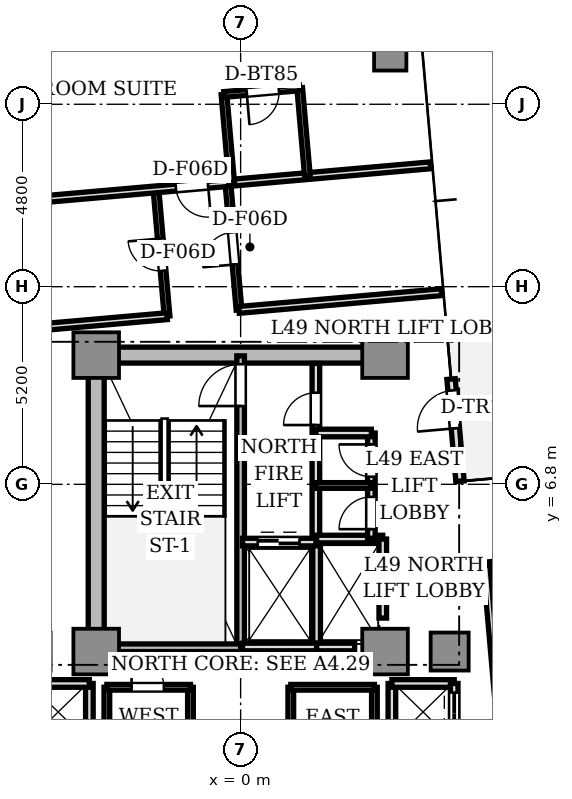
"""IFC4 building model, lengths in metres.
Left out: names, types, materials, properties, quantities, classifications, styles, units other than length and angle.
Written with IfcOpenShell. Run it as: python <this file> out.ifc"""

import sys

from ifc_helpers import new_model, si_unit, direction, frame, frame_2d, origin, origin_2d, place, context, subcontext, project, spatial, rectangle, extrude, source, transform, mapped, element, fill, save


model = new_model("IFC4")
c1 = context("Model", 3, precision=1e-05, world=origin(), true_north=direction((0.0, 1.0)))
c2 = subcontext(c1, "Body", "Model", "MODEL_VIEW")
j1 = project(units=[si_unit("LENGTHUNIT", "METRE"), si_unit("PLANEANGLEUNIT", "RADIAN")], contexts=[c1])
p1 = place(None, origin())
s1 = spatial("IfcSite", under=j1, at=p1, CompositionType="ELEMENT")
p2 = place(p1, origin())
s2 = spatial("IfcBuilding", under=s1, at=p2, CompositionType="ELEMENT")
p3 = place(p2, frame((0.0, 0.0, 178.55)))
s3 = spatial("IfcBuildingStorey", under=s2, at=p3, CompositionType="ELEMENT", Elevation=178.55)
p4 = place(p3, frame((-3.55, 10.2, 0.0), z_axis=(0.0, 0.0, 1.0), x_axis=(1.0, 0.0, 0.0)))
e1 = element("IfcWall", 1, at=p4, inside=s3, PredefinedType="SHEAR", context=c2, shape_type="SweptSolid", body=[
    extrude(rectangle(XDim=7.1, YDim=0.42, at=frame_2d((3.55, 0.0))), origin(), (0.0, 0.0, 1.0), 3.11),
])
p5 = place(p3, frame((-3.8, 2.85, 0.0), z_axis=(0.0, 0.0, 1.0), x_axis=(0.0, 1.0, 0.0)))
e2 = element("IfcWall", 2, at=p5, inside=s3, PredefinedType="SHEAR", context=c2, shape_type="SweptSolid", body=[
    extrude(rectangle(XDim=6.9, YDim=0.42, at=frame_2d((3.45, 0.0))), origin(), (0.0, 0.0, 1.0), 3.11),
])
m1 = source(origin(), c2, "Body", "SweptSolid", [
    extrude(rectangle(XDim=1.2, YDim=1.2, at=origin_2d()), origin(), (0.0, 0.0, 1.0), 3.11),
])
for number, where, z_axis, x_axis in (
    (3, (-3.8, 2.4, 0.0), (0.0, 0.0, 1.0), (1.0, 0.0, 0.0)),
    (4, (3.8, 2.4, 0.0), (0.0, 0.0, 1.0), (1.0, 0.0, 0.0)),
    (5, (-3.8, 10.2, 0.0), (0.0, 0.0, 1.0), (1.0, 0.0, 0.0)),
    (6, (3.8, 10.2, 0.0), (0.0, 0.0, 1.0), (1.0, 0.0, 0.0)),
):
    element("IfcColumn", number, at=place(p3, frame(where, z_axis=z_axis, x_axis=x_axis)), inside=s3, PredefinedType="COLUMN", context=c2, shape_type="MappedRepresentation", body=[
        mapped(m1, transform((0.0, 0.0, 0.0), scale=1.0)),
    ])
m2 = source(origin(), c2, "Body", "SweptSolid", [
    extrude(rectangle(XDim=1.0, YDim=1.0, at=origin_2d()), origin(), (0.0, 0.0, 1.0), 3.11),
])
p6 = place(p3, frame((5.5, 2.4, 0.0), z_axis=(0.0, 0.0, 1.0), x_axis=(1.0, 0.0, 0.0)))
e7 = element("IfcColumn", 7, at=p6, inside=s3, PredefinedType="COLUMN", context=c2, shape_type="MappedRepresentation", body=[
    mapped(m2, transform((0.0, 0.0, 0.0), scale=1.0)),
])
m3 = source(origin(), c2, "Body", "SweptSolid", [
    extrude(rectangle(XDim=0.85, YDim=0.85, at=origin_2d()), origin(), (0.0, 0.0, 1.0), 3.11),
])
p7 = place(p3, frame((3.936, 18.112, 0.0), z_axis=(0.0, 0.0, 1.0), x_axis=(1.0, 0.0, 0.0)))
e8 = element("IfcColumn", 8, at=p7, inside=s3, PredefinedType="COLUMN", context=c2, shape_type="MappedRepresentation", body=[
    mapped(m3, transform((0.0, 0.0, 0.0), scale=1.0)),
])
p8 = place(p3, frame((5.772, 6.879, 0.0), z_axis=(0.0, 0.0, 1.0), x_axis=(-0.087168071984, 0.996193619346, 0.0)))
e9 = element("IfcWall", 9, at=p8, inside=s3, PredefinedType="STANDARD", context=c2, shape_type="SweptSolid", body=[
    extrude(rectangle(XDim=2.7, YDim=0.22, at=frame_2d((1.35, 0.0))), origin(), (0.0, 0.0, 1.0), 3.11),
])
p9 = place(p8, frame((1.4, 0.0, 0.0)))
e10 = element("IfcOpeningElement", 10, at=p9, cuts=e9, PredefinedType="OPENING", context=c2, shape_type="SweptSolid", body=[
    extrude(rectangle(XDim=1.0, YDim=2.2, at=frame_2d((0.5, 1.1))), frame((0.0, 0.12, 0.0), z_axis=(0.0, -1.0, 0.0), x_axis=(1.0, 0.0, 0.0)), (0.0, 0.0, 1.0), 0.24),
])
p10 = place(p3, frame((0.0, 2.5, 0.0), z_axis=(0.0, 0.0, 1.0), x_axis=(0.0, 1.0, 0.0)))
e11 = element("IfcWall", 11, at=p10, inside=s3, PredefinedType="SOLIDWALL", context=c2, shape_type="SweptSolid", body=[
    extrude(rectangle(XDim=7.68, YDim=0.2, at=frame_2d((3.84, 0.0))), origin(), (0.0, 0.0, 1.0), 3.11),
])
p11 = place(p10, frame((6.36, 0.0, 0.0)))
e12 = element("IfcOpeningElement", 12, at=p11, cuts=e11, PredefinedType="OPENING", context=c2, shape_type="SweptSolid", body=[
    extrude(rectangle(XDim=1.1, YDim=2.15, at=frame_2d((0.55, 1.075))), frame((0.0, 0.11, 0.0), z_axis=(0.0, -1.0, 0.0), x_axis=(1.0, 0.0, 0.0)), (0.0, 0.0, 1.0), 0.22),
])
p12 = place(p3, frame((-3.72, 2.5, 0.0), z_axis=(0.0, 0.0, 1.0), x_axis=(1.0, 0.0, 0.0)))
e13 = element("IfcWall", 13, at=p12, inside=s3, PredefinedType="SOLIDWALL", context=c2, shape_type="SweptSolid", body=[
    extrude(rectangle(XDim=3.72, YDim=0.2, at=frame_2d((1.86, 0.0))), origin(), (0.0, 0.0, 1.0), 3.11),
])
p13 = place(p3, frame((1.98, 5.32, 0.0), z_axis=(0.0, 0.0, 1.0), x_axis=(0.0, 1.0, 0.0)))
e14 = element("IfcWall", 14, at=p13, inside=s3, PredefinedType="SOLIDWALL", context=c2, shape_type="SweptSolid", body=[
    extrude(rectangle(XDim=4.66, YDim=0.2, at=frame_2d((2.33, 0.0))), origin(), (0.0, 0.0, 1.0), 2.66),
])
p14 = place(p13, frame((3.04, 0.0, 0.0)))
e15 = element("IfcOpeningElement", 15, at=p14, cuts=e14, PredefinedType="OPENING", context=c2, shape_type="SweptSolid", body=[
    extrude(rectangle(XDim=0.85, YDim=2.1, at=frame_2d((0.425, 1.05))), frame((0.0, 0.11, 0.0), z_axis=(0.0, -1.0, 0.0), x_axis=(1.0, 0.0, 0.0)), (0.0, 0.0, 1.0), 0.22),
])
p15 = place(p3, frame((2.0, 2.5, 0.0), z_axis=(0.0, 0.0, 1.0), x_axis=(0.0, 1.0, 0.0)))
e16 = element("IfcWall", 16, at=p15, inside=s3, PredefinedType="SOLIDWALL", context=c2, shape_type="SweptSolid", body=[
    extrude(rectangle(XDim=2.78, YDim=0.2, at=frame_2d((1.39, 0.0))), origin(), (0.0, 0.0, 1.0), 2.66),
])
p16 = place(p3, frame((0.05, 2.52, 0.0), z_axis=(0.0, 0.0, 1.0), x_axis=(1.0, 0.0, 0.0)))
e17 = element("IfcWall", 17, at=p16, inside=s3, PredefinedType="SOLIDWALL", context=c2, shape_type="SweptSolid", body=[
    extrude(rectangle(XDim=1.95, YDim=0.2, at=frame_2d((0.975, 0.0))), origin(), (0.0, 0.0, 1.0), 2.66),
])
p17 = place(p3, frame((0.05, 5.28, 0.0), z_axis=(0.0, 0.0, 1.0), x_axis=(1.0, 0.0, 0.0)))
e18 = element("IfcWall", 18, at=p17, inside=s3, PredefinedType="SOLIDWALL", context=c2, shape_type="SweptSolid", body=[
    extrude(rectangle(XDim=1.93, YDim=0.2, at=frame_2d((0.965, 0.0))), origin(), (0.0, 0.0, 1.0), 2.66),
])
p18 = place(p17, frame((0.4, 0.0, 0.0)))
e19 = element("IfcOpeningElement", 19, at=p18, cuts=e18, PredefinedType="OPENING", context=c2, shape_type="SweptSolid", body=[
    extrude(rectangle(XDim=1.1, YDim=2.2, at=frame_2d((0.55, 1.1))), frame((0.0, 0.11, 0.0), z_axis=(0.0, -1.0, 0.0), x_axis=(1.0, 0.0, 0.0)), (0.0, 0.0, 1.0), 0.22),
])
p19 = place(p3, frame((2.0, 2.52, 0.0), z_axis=(0.0, 0.0, 1.0), x_axis=(1.0, 0.0, 0.0)))
e20 = element("IfcWall", 20, at=p19, inside=s3, PredefinedType="SOLIDWALL", context=c2, shape_type="SweptSolid", body=[
    extrude(rectangle(XDim=1.0, YDim=0.2, at=frame_2d((0.5, 0.0))), origin(), (0.0, 0.0, 1.0), 2.66),
])
p20 = place(p3, frame((2.0, 5.36, 0.0), z_axis=(0.0, 0.0, 1.0), x_axis=(1.0, 0.0, 0.0)))
e21 = element("IfcWall", 21, at=p20, inside=s3, PredefinedType="SOLIDWALL", context=c2, shape_type="SweptSolid", body=[
    extrude(rectangle(XDim=1.74, YDim=0.2, at=frame_2d((0.87, 0.0))), origin(), (0.0, 0.0, 1.0), 2.66),
])
p21 = place(p3, frame((3.74, 3.28, 0.0), z_axis=(0.0, 0.0, 1.0), x_axis=(0.0, 1.0, 0.0)))
e22 = element("IfcWall", 22, at=p21, inside=s3, PredefinedType="SOLIDWALL", context=c2, shape_type="SweptSolid", body=[
    extrude(rectangle(XDim=2.08, YDim=0.2, at=frame_2d((1.04, 0.0))), origin(), (0.0, 0.0, 1.0), 2.66),
])
p22 = place(p21, frame((0.44, 0.0, 0.0)))
e23 = element("IfcOpeningElement", 23, at=p22, cuts=e22, PredefinedType="OPENING", context=c2, shape_type="SweptSolid", body=[
    extrude(rectangle(XDim=1.2, YDim=2.2, at=frame_2d((0.6, 1.1))), frame((0.0, 0.11, 0.0), z_axis=(0.0, -1.0, 0.0), x_axis=(1.0, 0.0, 0.0)), (0.0, 0.0, 1.0), 0.22),
])
p23 = place(p3, frame((3.98, -1.56, 0.0), z_axis=(0.0, 0.0, 1.0), x_axis=(0.0, 1.0, 0.0)))
e24 = element("IfcWall", 24, at=p23, inside=s3, PredefinedType="SOLIDWALL", context=c2, shape_type="SweptSolid", body=[
    extrude(rectangle(XDim=3.12, YDim=0.2, at=frame_2d((1.56, 0.0))), origin(), (0.0, 0.0, 1.0), 2.28),
])
p24 = place(p3, frame((3.98, 1.56, 0.0), z_axis=(0.0, 0.0, 1.0), x_axis=(1.0, 0.0, 0.0)))
e25 = element("IfcWall", 25, at=p24, inside=s3, PredefinedType="SOLIDWALL", context=c2, shape_type="SweptSolid", body=[
    extrude(rectangle(XDim=1.64, YDim=0.2, at=frame_2d((0.82, 0.0))), origin(), (0.0, 0.0, 1.0), 2.66),
])
p25 = place(p3, frame((5.62, 0.0, 0.0), z_axis=(0.0, 0.0, 1.0), x_axis=(0.0, 1.0, 0.0)))
e26 = element("IfcWall", 26, at=p25, inside=s3, PredefinedType="SOLIDWALL", context=c2, shape_type="SweptSolid", body=[
    extrude(rectangle(XDim=1.56, YDim=0.2, at=frame_2d((0.78, 0.0))), origin(), (0.0, 0.0, 1.0), 2.66),
])
p26 = place(p25, frame((0.22, 0.0, 0.0)))
e27 = element("IfcOpeningElement", 27, at=p26, cuts=e26, PredefinedType="OPENING", context=c2, shape_type="SweptSolid", body=[
    extrude(rectangle(XDim=1.1, YDim=2.2, at=frame_2d((0.55, 1.1))), frame((0.0, 0.11, 0.0), z_axis=(0.0, -1.0, 0.0), x_axis=(1.0, 0.0, 0.0)), (0.0, 0.0, 1.0), 0.22),
])
p27 = place(p3, frame((-3.98, -1.56, 0.0), z_axis=(0.0, 0.0, 1.0), x_axis=(0.0, 1.0, 0.0)))
e28 = element("IfcWall", 28, at=p27, inside=s3, PredefinedType="SOLIDWALL", context=c2, shape_type="SweptSolid", body=[
    extrude(rectangle(XDim=3.12, YDim=0.2, at=frame_2d((1.56, 0.0))), origin(), (0.0, 0.0, 1.0), 2.28),
])
p28 = place(p3, frame((-5.62, 1.56, 0.0), z_axis=(0.0, 0.0, 1.0), x_axis=(1.0, 0.0, 0.0)))
e29 = element("IfcWall", 29, at=p28, inside=s3, PredefinedType="SOLIDWALL", context=c2, shape_type="SweptSolid", body=[
    extrude(rectangle(XDim=1.64, YDim=0.2, at=frame_2d((0.82, 0.0))), origin(), (0.0, 0.0, 1.0), 2.66),
])
p29 = place(p3, frame((3.44, 5.38, 0.0), z_axis=(0.0, 0.0, 1.0), x_axis=(0.0, 1.0, 0.0)))
e30 = element("IfcWall", 30, at=p29, inside=s3, PredefinedType="SOLIDWALL", context=c2, shape_type="SweptSolid", body=[
    extrude(rectangle(XDim=2.77, YDim=0.2, at=frame_2d((1.385, 0.0))), origin(), (0.0, 0.0, 1.0), 2.66),
])
p30 = place(p29, frame((0.24, 0.0, 0.0)))
e31 = element("IfcOpeningElement", 31, at=p30, cuts=e30, PredefinedType="OPENING", context=c2, shape_type="SweptSolid", body=[
    extrude(rectangle(XDim=0.85, YDim=2.1, at=frame_2d((0.425, 1.05))), frame((0.0, 0.11, 0.0), z_axis=(0.0, -1.0, 0.0), x_axis=(1.0, 0.0, 0.0)), (0.0, 0.0, 1.0), 0.22),
])
p31 = place(p29, frame((1.62, 0.0, 0.0)))
e32 = element("IfcOpeningElement", 32, at=p31, cuts=e30, PredefinedType="OPENING", context=c2, shape_type="SweptSolid", body=[
    extrude(rectangle(XDim=0.85, YDim=2.1, at=frame_2d((0.425, 1.05))), frame((0.0, 0.11, 0.0), z_axis=(0.0, -1.0, 0.0), x_axis=(1.0, 0.0, 0.0)), (0.0, 0.0, 1.0), 0.22),
])
p32 = place(p3, frame((1.98, 8.15, 0.0), z_axis=(0.0, 0.0, 1.0), x_axis=(1.0, 0.0, 0.0)))
e33 = element("IfcWall", 33, at=p32, inside=s3, PredefinedType="SOLIDWALL", context=c2, shape_type="SweptSolid", body=[
    extrude(rectangle(XDim=1.46, YDim=0.2, at=frame_2d((0.73, 0.0))), origin(), (0.0, 0.0, 1.0), 2.66),
])
p33 = place(p3, frame((1.98, 6.77, 0.0), z_axis=(0.0, 0.0, 1.0), x_axis=(1.0, 0.0, 0.0)))
e34 = element("IfcWall", 34, at=p33, inside=s3, PredefinedType="PARTITIONING", context=c2, shape_type="SweptSolid", body=[
    extrude(rectangle(XDim=1.46, YDim=0.15, at=frame_2d((0.73, 0.0))), origin(), (0.0, 0.0, 1.0), 2.66),
])
p34 = place(p3, frame((-1.32, -1.46, 0.0), z_axis=(0.0, 0.0, 1.0), x_axis=(0.0, 1.0, 0.0)))
e35 = element("IfcWall", 35, at=p34, inside=s3, PredefinedType="PARTITIONING", context=c2, shape_type="SweptSolid", body=[
    extrude(rectangle(XDim=2.92, YDim=0.15, at=frame_2d((1.46, 0.0))), origin(), (0.0, 0.0, 1.0), 2.66),
])
p35 = place(p3, frame((-3.52, -1.46, 0.0), z_axis=(0.0, 0.0, 1.0), x_axis=(0.0, 1.0, 0.0)))
e36 = element("IfcWall", 36, at=p35, inside=s3, PredefinedType="PARTITIONING", context=c2, shape_type="SweptSolid", body=[
    extrude(rectangle(XDim=2.92, YDim=0.15, at=frame_2d((1.46, 0.0))), origin(), (0.0, 0.0, 1.0), 2.28),
])
p36 = place(p3, frame((-3.52, 1.46, 0.0), z_axis=(0.0, 0.0, 1.0), x_axis=(1.0, 0.0, 0.0)))
e37 = element("IfcWall", 37, at=p36, inside=s3, PredefinedType="PARTITIONING", context=c2, shape_type="SweptSolid", body=[
    extrude(rectangle(XDim=2.2, YDim=0.15, at=frame_2d((1.1, 0.0))), origin(), (0.0, 0.0, 1.0), 2.66),
])
p37 = place(p36, frame((0.65, 0.0, 0.0)))
e38 = element("IfcOpeningElement", 38, at=p37, cuts=e37, PredefinedType="OPENING", context=c2, shape_type="SweptSolid", body=[
    extrude(rectangle(XDim=0.85, YDim=2.1, at=frame_2d((0.425, 1.05))), frame((0.0, 0.085, 0.0), z_axis=(0.0, -1.0, 0.0), x_axis=(1.0, 0.0, 0.0)), (0.0, 0.0, 1.0), 0.17),
])
p38 = place(p3, frame((1.32, -1.46, 0.0), z_axis=(0.0, 0.0, 1.0), x_axis=(0.0, 1.0, 0.0)))
e39 = element("IfcWall", 39, at=p38, inside=s3, PredefinedType="PARTITIONING", context=c2, shape_type="SweptSolid", body=[
    extrude(rectangle(XDim=2.92, YDim=0.15, at=frame_2d((1.46, 0.0))), origin(), (0.0, 0.0, 1.0), 2.66),
])
p39 = place(p3, frame((3.52, -1.46, 0.0), z_axis=(0.0, 0.0, 1.0), x_axis=(0.0, 1.0, 0.0)))
e40 = element("IfcWall", 40, at=p39, inside=s3, PredefinedType="PARTITIONING", context=c2, shape_type="SweptSolid", body=[
    extrude(rectangle(XDim=2.92, YDim=0.15, at=frame_2d((1.46, 0.0))), origin(), (0.0, 0.0, 1.0), 2.28),
])
p40 = place(p3, frame((1.32, 1.46, 0.0), z_axis=(0.0, 0.0, 1.0), x_axis=(1.0, 0.0, 0.0)))
e41 = element("IfcWall", 41, at=p40, inside=s3, PredefinedType="PARTITIONING", context=c2, shape_type="SweptSolid", body=[
    extrude(rectangle(XDim=2.2, YDim=0.15, at=frame_2d((1.1, 0.0))), origin(), (0.0, 0.0, 1.0), 2.66),
])
p41 = place(p3, frame((6.467, 4.681, 0.0), z_axis=(0.0, 0.0, 1.0), x_axis=(0.996195452949, 0.087147114263, 0.0)))
e42 = element("IfcWall", 42, at=p41, inside=s3, PredefinedType="PARTITIONING", context=c2, shape_type="SweptSolid", body=[
    extrude(rectangle(XDim=8.55, YDim=0.15, at=frame_2d((4.275, 0.0))), origin(), (0.0, 0.0, 1.0), 2.66),
])
p42 = place(p41, frame((1.491, 0.0, 0.0)))
e43 = element("IfcOpeningElement", 43, at=p42, cuts=e42, PredefinedType="OPENING", context=c2, shape_type="SweptSolid", body=[
    extrude(rectangle(XDim=0.85, YDim=2.1, at=frame_2d((0.425, 1.05))), frame((0.0, 0.085, 0.0), z_axis=(0.0, -1.0, 0.0), x_axis=(1.0, 0.0, 0.0)), (0.0, 0.0, 1.0), 0.17),
])
p43 = place(p41, frame((4.792, 0.0, 0.0)))
e44 = element("IfcOpeningElement", 44, at=p43, cuts=e42, PredefinedType="OPENING", context=c2, shape_type="SweptSolid", body=[
    extrude(rectangle(XDim=0.85, YDim=2.1, at=frame_2d((0.425, 1.05))), frame((0.0, 0.085, 0.0), z_axis=(0.0, -1.0, 0.0), x_axis=(1.0, 0.0, 0.0)), (0.0, 0.0, 1.0), 0.17),
])
p44 = place(p3, frame((7.373, -5.679, 0.0), z_axis=(0.0, 0.0, 1.0), x_axis=(-0.087163455754, 0.996194023261, 0.0)))
e45 = element("IfcWall", 45, at=p44, inside=s3, PredefinedType="PARTITIONING", context=c2, shape_type="SweptSolid", body=[
    extrude(rectangle(XDim=10.4, YDim=0.18, at=frame_2d((5.2, 0.0))), origin(), (0.0, 0.0, 1.0), 2.66),
])
p45 = place(p3, frame((-1.936, 11.224, 0.0), z_axis=(0.0, 0.0, 1.0), x_axis=(-0.087164238054, 0.996193954812, 0.0)))
e46 = element("IfcWall", 46, at=p45, inside=s3, PredefinedType="PARTITIONING", context=c2, shape_type="SweptSolid", body=[
    extrude(rectangle(XDim=3.35, YDim=0.15, at=frame_2d((1.675, 0.0))), origin(), (0.0, 0.0, 1.0), 2.66),
])
p46 = place(p45, frame((1.2, 0.0, 0.0)))
e47 = element("IfcOpeningElement", 47, at=p46, cuts=e46, PredefinedType="OPENING", context=c2, shape_type="SweptSolid", body=[
    extrude(rectangle(XDim=0.85, YDim=2.1, at=frame_2d((0.425, 1.05))), frame((0.0, 0.085, 0.0), z_axis=(0.0, -1.0, 0.0), x_axis=(1.0, 0.0, 0.0)), (0.0, 0.0, 1.0), 0.17),
])
p47 = place(p3, frame((-0.043, 11.39, 0.0), z_axis=(0.0, 0.0, 1.0), x_axis=(-0.087164238054, 0.996193954812, 0.0)))
e48 = element("IfcWall", 48, at=p47, inside=s3, PredefinedType="PARTITIONING", context=c2, shape_type="SweptSolid", body=[
    extrude(rectangle(XDim=3.35, YDim=0.15, at=frame_2d((1.675, 0.0))), origin(), (0.0, 0.0, 1.0), 2.66),
])
p48 = place(p47, frame((1.2, 0.0, 0.0)))
e49 = element("IfcOpeningElement", 49, at=p48, cuts=e48, PredefinedType="OPENING", context=c2, shape_type="SweptSolid", body=[
    extrude(rectangle(XDim=0.85, YDim=2.1, at=frame_2d((0.425, 1.05))), frame((0.0, 0.085, 0.0), z_axis=(0.0, -1.0, 0.0), x_axis=(1.0, 0.0, 0.0)), (0.0, 0.0, 1.0), 0.17),
])
for number, where, z_axis, x_axis in (
    (50, (-1.936, 11.224, 0.0), (0.0, 0.0, 1.0), (-0.996, -0.087, 0.0)),
    (51, (5.287, 11.856, 0.0), (0.0, 0.0, 1.0), (-0.996, -0.087, 0.0)),
):
    element("IfcWall", number, at=place(p3, frame(where, z_axis=z_axis, x_axis=x_axis)), inside=s3, PredefinedType="PARTITIONING", context=c2, shape_type="SweptSolid", body=[
        extrude(rectangle(XDim=5.35, YDim=0.18, at=frame_2d((2.675, 0.0))), origin(), (0.0, 0.0, 1.0), 2.66),
    ])
p49 = place(p3, frame((4.995, 15.193, 0.0), z_axis=(0.0, 0.0, 1.0), x_axis=(-0.996194790044, -0.087154691724, 0.0)))
e52 = element("IfcWall", 52, at=p49, inside=s3, PredefinedType="PARTITIONING", context=c2, shape_type="SweptSolid", body=[
    extrude(rectangle(XDim=12.6, YDim=0.18, at=frame_2d((6.3, 0.0))), origin(), (0.0, 0.0, 1.0), 2.66),
])
p50 = place(p49, frame((5.875, 0.0, 0.0)))
e53 = element("IfcOpeningElement", 53, at=p50, cuts=e52, PredefinedType="OPENING", context=c2, shape_type="SweptSolid", body=[
    extrude(rectangle(XDim=0.85, YDim=2.1, at=frame_2d((0.425, 1.05))), frame((0.0, 0.1, 0.0), z_axis=(0.0, -1.0, 0.0), x_axis=(1.0, 0.0, 0.0)), (0.0, 0.0, 1.0), 0.2),
])
for number, where, z_axis, x_axis in (
    (54, (-0.235, 14.736, 0.0), (0.0, 0.0, 1.0), (-0.087, 0.996, 0.0)),
    (55, (1.757, 14.91, 0.0), (0.0, 0.0, 1.0), (-0.087, 0.996, 0.0)),
):
    element("IfcWall", number, at=place(p3, frame(where, z_axis=z_axis, x_axis=x_axis)), inside=s3, PredefinedType="PARTITIONING", context=c2, shape_type="SweptSolid", body=[
        extrude(rectangle(XDim=2.331, YDim=0.15, at=frame_2d((1.166, 0.0))), origin(), (0.0, 0.0, 1.0), 2.66),
    ])
p51 = place(p3, frame((1.554, 17.232, 0.0), z_axis=(0.0, 0.0, 1.0), x_axis=(-0.996193717496, -0.087166950281, 0.0)))
e56 = element("IfcWall", 56, at=p51, inside=s3, PredefinedType="PARTITIONING", context=c2, shape_type="SweptSolid", body=[
    extrude(rectangle(XDim=2.0, YDim=0.15, at=frame_2d((1.0, 0.0))), origin(), (0.0, 0.0, 1.0), 2.66),
])
p52 = place(p51, frame((0.55, 0.0, 0.0)))
e57 = element("IfcOpeningElement", 57, at=p52, cuts=e56, PredefinedType="OPENING", context=c2, shape_type="SweptSolid", body=[
    extrude(rectangle(XDim=0.85, YDim=2.1, at=frame_2d((0.425, 1.05))), frame((0.0, 0.085, 0.0), z_axis=(0.0, -1.0, 0.0), x_axis=(1.0, 0.0, 0.0)), (0.0, 0.0, 1.0), 0.17),
])
m4 = source(origin(), c2, "Body", "SweptSolid", [
    extrude(rectangle(XDim=1.0, YDim=0.05, at=origin_2d()), origin(), (0.0, 0.0, 1.0), 2.2),
])
p53 = place(p9, frame((0.5, 0.0, 0.0)))
e58 = element("IfcDoor", 58, at=p53, inside=s3, OperationType="SINGLE_SWING_LEFT", PredefinedType="DOOR", context=c2, shape_type="MappedRepresentation", body=[
    mapped(m4, transform((0.0, 0.0, 0.0), scale=1.0)),
])
fill(e10, e58)
m5 = source(origin(), c2, "Body", "SweptSolid", [
    extrude(rectangle(XDim=1.1, YDim=0.05, at=origin_2d()), origin(), (0.0, 0.0, 1.0), 2.15),
])
p54 = place(p11, frame((0.55, 0.0, 0.0)))
e59 = element("IfcDoor", 59, at=p54, inside=s3, OperationType="SINGLE_SWING_LEFT", PredefinedType="DOOR", context=c2, shape_type="MappedRepresentation", body=[
    mapped(m5, transform((0.0, 0.0, 0.0), scale=1.0)),
])
fill(e12, e59)
m6 = source(origin(), c2, "Body", "SweptSolid", [
    extrude(rectangle(XDim=0.85, YDim=0.05, at=origin_2d()), origin(), (0.0, 0.0, 1.0), 2.1),
])
p55 = place(p14, frame((0.425, 0.0, 0.0)))
e60 = element("IfcDoor", 60, at=p55, inside=s3, OperationType="SINGLE_SWING_LEFT", PredefinedType="DOOR", context=c2, shape_type="MappedRepresentation", body=[
    mapped(m6, transform((0.0, 0.0, 0.0), scale=1.0)),
])
fill(e15, e60)
m7 = source(origin(), c2, "Body", "SweptSolid", [
    extrude(rectangle(XDim=1.1, YDim=0.05, at=origin_2d()), origin(), (0.0, 0.0, 1.0), 2.2),
])
p56 = place(p18, frame((0.55, 0.0, 0.0)))
e61 = element("IfcDoor", 61, at=p56, inside=s3, OperationType="DOUBLE_DOOR_SLIDING", PredefinedType="DOOR", context=c2, shape_type="MappedRepresentation", body=[
    mapped(m7, transform((0.0, 0.0, 0.0), scale=1.0)),
])
fill(e19, e61)
m8 = source(origin(), c2, "Body", "SweptSolid", [
    extrude(rectangle(XDim=1.2, YDim=0.05, at=origin_2d()), origin(), (0.0, 0.0, 1.0), 2.2),
])
p57 = place(p22, frame((0.6, 0.0, 0.0)))
e62 = element("IfcDoor", 62, at=p57, inside=s3, OperationType="DOUBLE_DOOR_SLIDING", PredefinedType="DOOR", context=c2, shape_type="MappedRepresentation", body=[
    mapped(m8, transform((0.0, 0.0, 0.0), scale=1.0)),
])
fill(e23, e62)
p58 = place(p26, frame((0.55, 0.0, 0.0)))
e63 = element("IfcDoor", 63, at=p58, inside=s3, OperationType="DOUBLE_DOOR_SLIDING", PredefinedType="DOOR", context=c2, shape_type="MappedRepresentation", body=[
    mapped(m7, transform((0.0, 0.0, 0.0), scale=1.0)),
])
fill(e27, e63)
p59 = place(p30, frame((0.425, 0.0, 0.0)))
e64 = element("IfcDoor", 64, at=p59, inside=s3, OperationType="SINGLE_SWING_LEFT", PredefinedType="DOOR", context=c2, shape_type="MappedRepresentation", body=[
    mapped(m6, transform((0.0, 0.0, 0.0), scale=1.0)),
])
fill(e31, e64)
p60 = place(p31, frame((0.425, 0.0, 0.0)))
e65 = element("IfcDoor", 65, at=p60, inside=s3, OperationType="SINGLE_SWING_RIGHT", PredefinedType="DOOR", context=c2, shape_type="MappedRepresentation", body=[
    mapped(m6, transform((0.0, 0.0, 0.0), scale=1.0)),
])
fill(e32, e65)
p61 = place(p37, frame((0.425, 0.0, 0.0)))
e66 = element("IfcDoor", 66, at=p61, inside=s3, OperationType="SINGLE_SWING_LEFT", PredefinedType="DOOR", context=c2, shape_type="MappedRepresentation", body=[
    mapped(m6, transform((0.0, 0.0, 0.0), scale=1.0)),
])
fill(e38, e66)
p62 = place(p46, frame((0.425, 0.0, 0.0)))
e67 = element("IfcDoor", 67, at=p62, inside=s3, OperationType="SINGLE_SWING_RIGHT", PredefinedType="DOOR", context=c2, shape_type="MappedRepresentation", body=[
    mapped(m6, transform((0.0, 0.0, 0.0), scale=1.0)),
])
fill(e47, e67)
p63 = place(p48, frame((0.425, 0.0, 0.0)))
e68 = element("IfcDoor", 68, at=p63, inside=s3, OperationType="SINGLE_SWING_LEFT", PredefinedType="DOOR", context=c2, shape_type="MappedRepresentation", body=[
    mapped(m6, transform((0.0, 0.0, 0.0), scale=1.0)),
])
fill(e49, e68)
p64 = place(p52, frame((0.425, 0.0, 0.0)))
e69 = element("IfcDoor", 69, at=p64, inside=s3, OperationType="SINGLE_SWING_RIGHT", PredefinedType="DOOR", context=c2, shape_type="MappedRepresentation", body=[
    mapped(m6, transform((0.0, 0.0, 0.0), scale=1.0)),
])
fill(e57, e69)
p65 = place(p50, frame((0.425, 0.0, 0.0)))
e70 = element("IfcDoor", 70, at=p65, inside=s3, OperationType="SINGLE_SWING_LEFT", PredefinedType="DOOR", context=c2, shape_type="MappedRepresentation", body=[
    mapped(m6, transform((0.0, 0.0, 0.0), scale=1.0)),
])
fill(e53, e70)
save(model, sys.argv[1])
